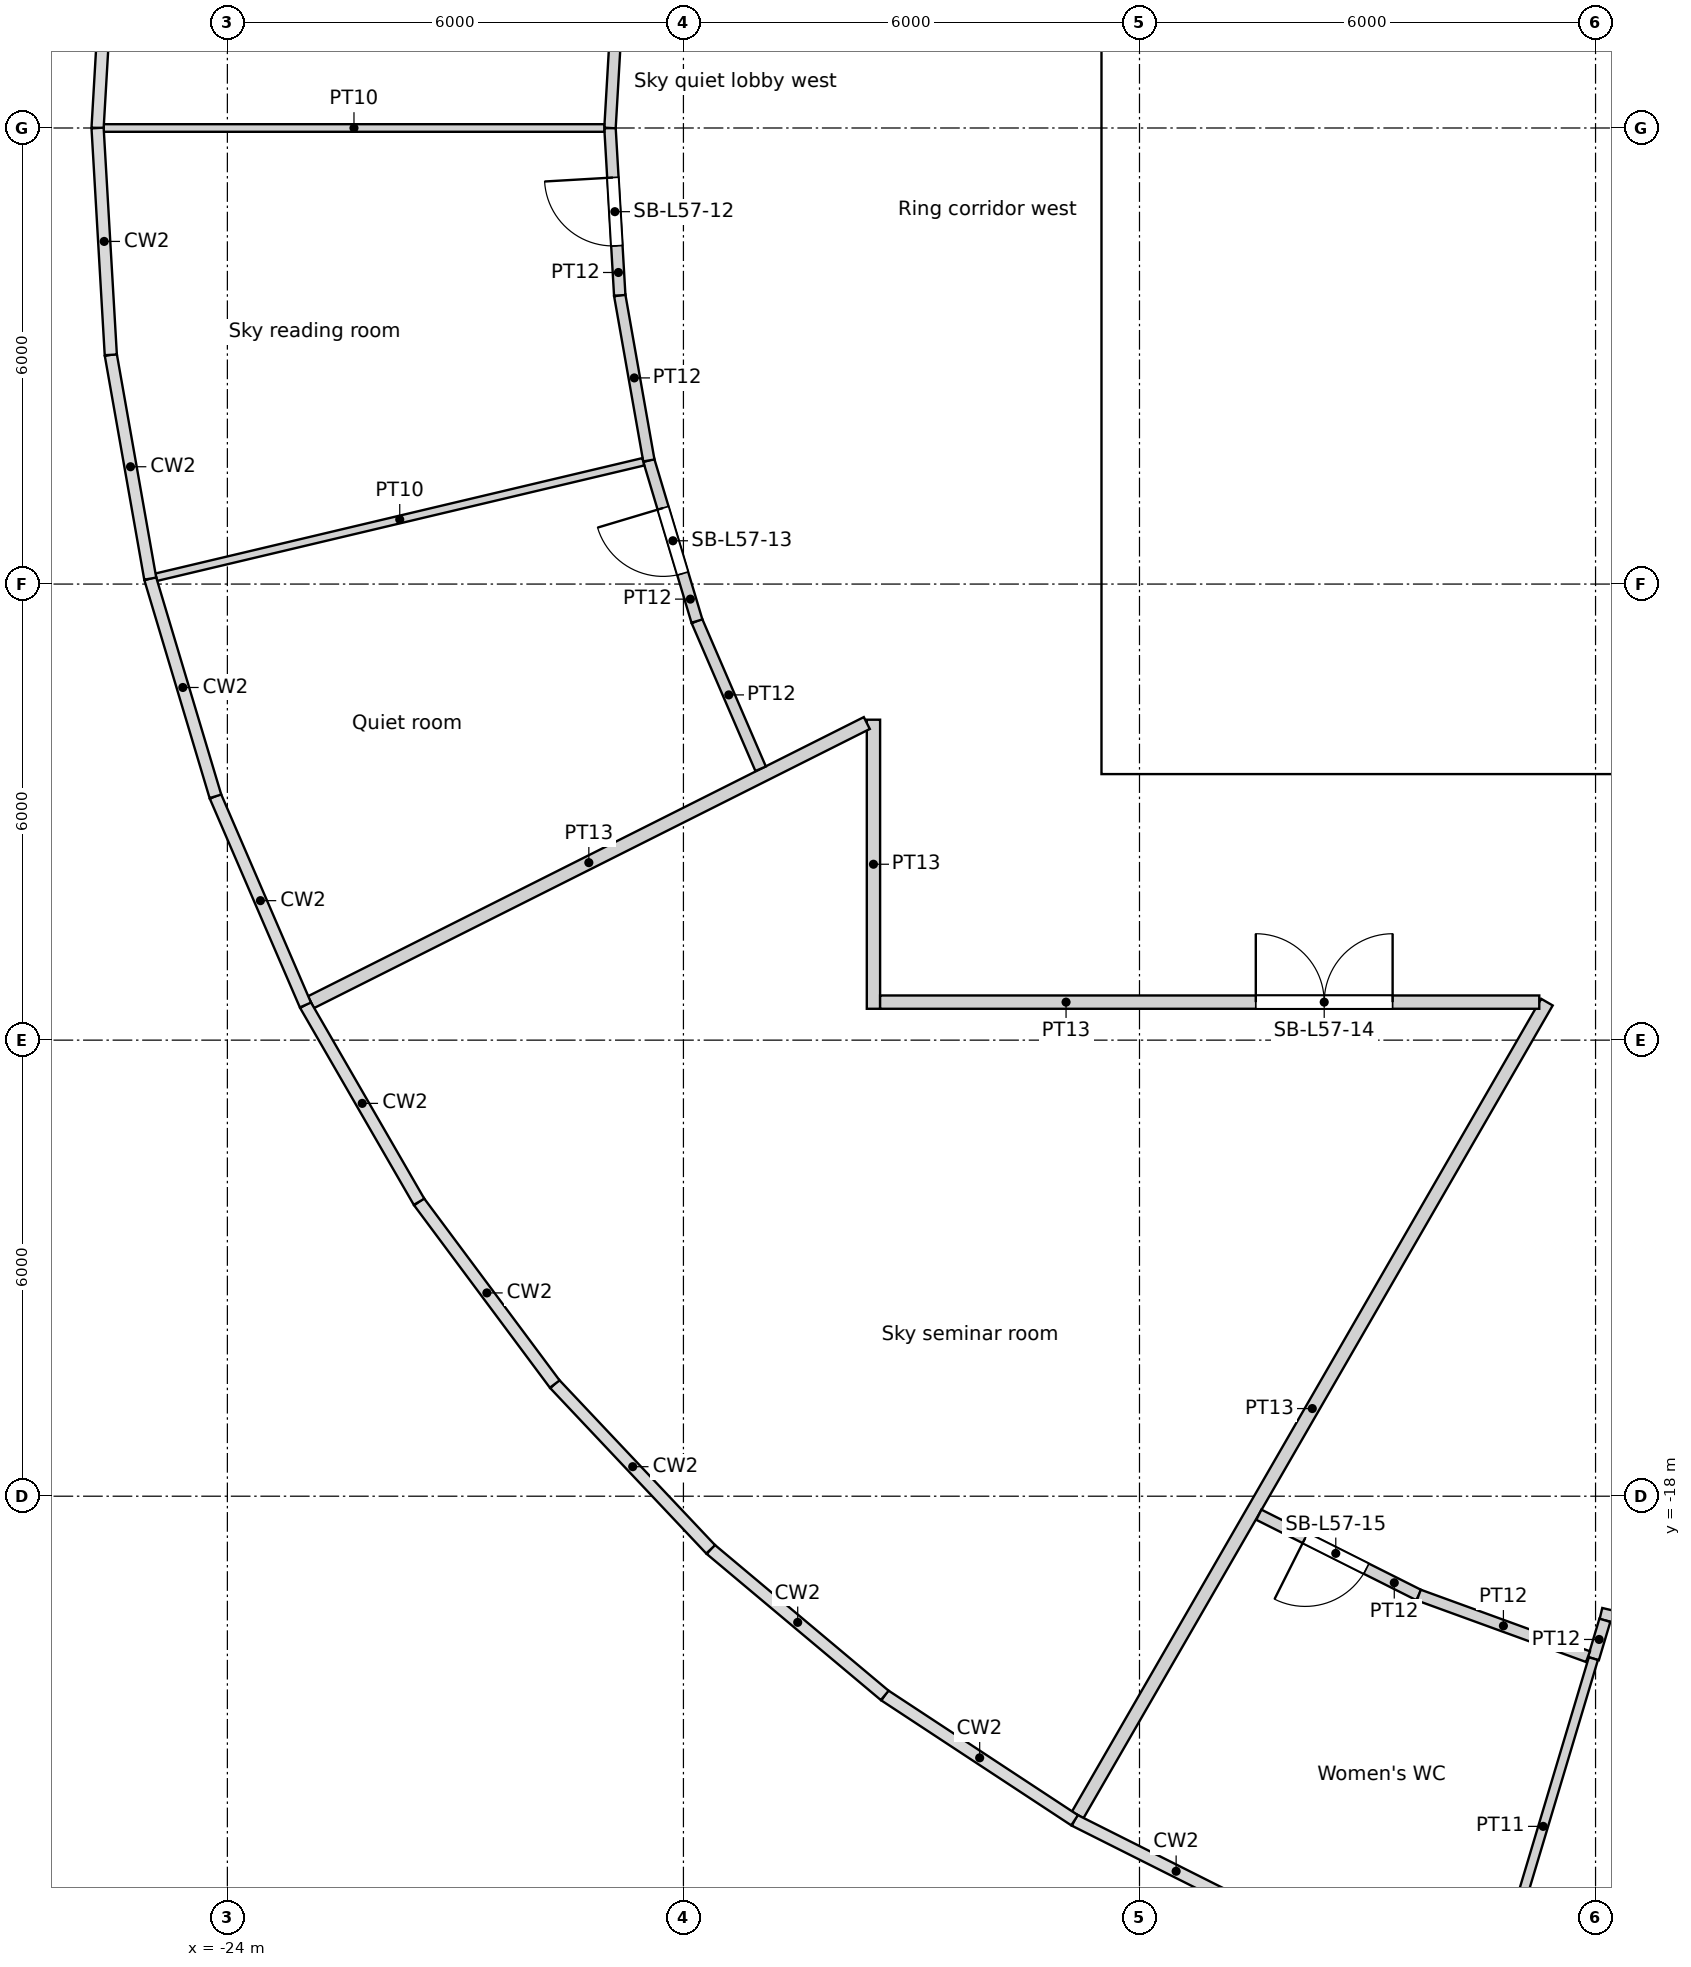
"""IFC4 building model, lengths in metres.
Left out: names, types, materials, properties, quantities, classifications, styles, units other than length and angle.
Written with IfcOpenShell. Run it as: python <this file> out.ifc"""

import sys

from ifc_helpers import new_model, si_unit, direction, frame, frame_2d, origin, origin_2d, place, context, subcontext, project, spatial, rectangle, circle, extrude, element, fill, save


model = new_model("IFC4")
c1 = context("Model", 3, precision=1e-05, world=origin(), true_north=direction((0.0, 1.0)))
c2 = subcontext(c1, "Body", "Model", "MODEL_VIEW")
j1 = project(units=[si_unit("LENGTHUNIT", "METRE"), si_unit("PLANEANGLEUNIT", "RADIAN")], contexts=[c1])
p1 = place(None, origin())
s1 = spatial("IfcSite", under=j1, at=p1, CompositionType="ELEMENT")
p2 = place(p1, origin())
s2 = spatial("IfcBuilding", under=s1, at=p2, CompositionType="ELEMENT")
p3 = place(p2, frame((0.0, 0.0, 219.6)))
s3 = spatial("IfcBuildingStorey", under=s2, at=p3, CompositionType="ELEMENT", Elevation=219.6)
for number, where, z_axis, x_axis in (
    (1, (-24.382, -2.85, 0.0), (0.0, 0.0, 1.0), (1.0, 0.0, 0.0)),
    (2, (-23.067, -8.396, 0.0), (0.0, 0.0, 1.0), (1.0, 0.0, 0.0)),
    (3, (-20.509, -13.489, 0.0), (0.0, 0.0, 1.0), (1.0, 0.0, 0.0)),
    (4, (-16.846, -17.855, 0.0), (0.0, 0.0, 1.0), (1.0, 0.0, 0.0)),
    (5, (-12.274, -21.259, 0.0), (0.0, 0.0, 1.0), (1.0, 0.0, 0.0)),
    (6, (-7.04, -23.516, 0.0), (0.0, 0.0, 1.0), (1.0, 0.0, 0.0)),
):
    element("IfcColumn", number, at=place(p3, frame(where, z_axis=z_axis, x_axis=x_axis)), inside=s3, PredefinedType="COLUMN", context=c2, shape_type="SweptSolid", body=[
        extrude(circle(Radius=0.6, at=origin_2d()), origin(), (0.0, 0.0, 1.0), 5.4),
    ])
for number, where, z_axis, x_axis in (
    (7, (-18.612, -2.805, 0.0), (0.0, 0.0, 1.0), (1.0, 0.0, 0.0)),
    (8, (-16.958, -8.167, 0.0), (0.0, 0.0, 1.0), (1.0, 0.0, 0.0)),
    (9, (-13.798, -12.802, 0.0), (0.0, 0.0, 1.0), (1.0, 0.0, 0.0)),
    (10, (-9.411, -16.301, 0.0), (0.0, 0.0, 1.0), (1.0, 0.0, 0.0)),
):
    element("IfcColumn", number, at=place(p3, frame(where, z_axis=z_axis, x_axis=x_axis)), inside=s3, PredefinedType="COLUMN", context=c2, shape_type="SweptSolid", body=[
        extrude(circle(Radius=0.65, at=origin_2d()), origin(), (0.0, 0.0, 1.0), 5.4),
    ])
p4 = place(p3, frame((-12.5, -8.05, 0.0), z_axis=(0.0, 0.0, 1.0), x_axis=(1.0, 0.0, 0.0)))
e11 = element("IfcWall", 11, at=p4, inside=s3, PredefinedType="SOLIDWALL", context=c2, shape_type="SweptSolid", body=[
    extrude(rectangle(XDim=25.0, YDim=0.9, at=frame_2d((12.5, 0.0))), origin(), (0.0, 0.0, 1.0), 5.4),
])
p5 = place(p4, frame((13.4, 0.0, 0.0)))
e12 = element("IfcOpeningElement", 12, at=p5, cuts=e11, PredefinedType="OPENING", context=c2, shape_type="SweptSolid", body=[
    extrude(rectangle(XDim=1.0, YDim=2.1, at=frame_2d((0.5, 1.05))), frame((0.0, 0.45, 0.0), z_axis=(0.0, -1.0, 0.0), x_axis=(1.0, 0.0, 0.0)), (0.0, 0.0, 1.0), 0.9),
])
p6 = place(p4, frame((8.3, 0.0, 0.0)))
e13 = element("IfcOpeningElement", 13, at=p6, cuts=e11, PredefinedType="OPENING", context=c2, shape_type="SweptSolid", body=[
    extrude(rectangle(XDim=1.8, YDim=2.1, at=frame_2d((0.9, 1.05))), frame((0.0, 0.45, 0.0), z_axis=(0.0, -1.0, 0.0), x_axis=(1.0, 0.0, 0.0)), (0.0, 0.0, 1.0), 0.9),
])
p7 = place(p4, frame((14.9, 0.0, 0.0)))
e14 = element("IfcOpeningElement", 14, at=p7, cuts=e11, PredefinedType="OPENING", context=c2, shape_type="SweptSolid", body=[
    extrude(rectangle(XDim=1.8, YDim=2.1, at=frame_2d((0.9, 1.05))), frame((0.0, 0.45, 0.0), z_axis=(0.0, -1.0, 0.0), x_axis=(1.0, 0.0, 0.0)), (0.0, 0.0, 1.0), 0.9),
])
p8 = place(p3, frame((-12.05, -7.6, 0.0), z_axis=(0.0, 0.0, 1.0), x_axis=(0.0, 1.0, 0.0)))
e15 = element("IfcWall", 15, at=p8, inside=s3, PredefinedType="SOLIDWALL", context=c2, shape_type="SweptSolid", body=[
    extrude(rectangle(XDim=15.2, YDim=0.9, at=frame_2d((7.6, 0.0))), origin(), (0.0, 0.0, 1.0), 5.4),
])
p9 = place(p8, frame((7.1, 0.0, 0.0)))
e16 = element("IfcOpeningElement", 16, at=p9, cuts=e15, PredefinedType="OPENING", context=c2, shape_type="SweptSolid", body=[
    extrude(rectangle(XDim=1.0, YDim=2.1, at=frame_2d((0.5, 1.05))), frame((0.0, 0.45, 0.0), z_axis=(0.0, -1.0, 0.0), x_axis=(1.0, 0.0, 0.0)), (0.0, 0.0, 1.0), 0.9),
])
p10 = place(p3, frame((-8.9, -3.1, 0.0), z_axis=(0.0, 0.0, 1.0), x_axis=(1.0, 0.0, 0.0)))
e17 = element("IfcWall", 17, at=p10, inside=s3, PredefinedType="SOLIDWALL", context=c2, shape_type="SweptSolid", body=[
    extrude(rectangle(XDim=9.6, YDim=0.3, at=frame_2d((4.8, 0.0))), origin(), (0.0, 0.0, 1.0), 4.9),
])
p11 = place(p10, frame((4.75, 0.0, 0.0)))
e18 = element("IfcOpeningElement", 18, at=p11, cuts=e17, PredefinedType="OPENING", context=c2, shape_type="SweptSolid", body=[
    extrude(rectangle(XDim=1.7, YDim=2.1, at=frame_2d((0.85, 1.05))), frame((0.0, 0.15, 0.0), z_axis=(0.0, -1.0, 0.0), x_axis=(1.0, 0.0, 0.0)), (0.0, 0.0, 1.0), 0.3),
])
p12 = place(p3, frame((-8.9, 0.0, 0.0), z_axis=(0.0, 0.0, 1.0), x_axis=(1.0, 0.0, 0.0)))
e19 = element("IfcWall", 19, at=p12, inside=s3, PredefinedType="SOLIDWALL", context=c2, shape_type="SweptSolid", body=[
    extrude(rectangle(XDim=3.0, YDim=0.3, at=frame_2d((1.5, 0.0))), origin(), (0.0, 0.0, 1.0), 4.9),
])
p13 = place(p3, frame((-5.75, -2.95, 0.0), z_axis=(0.0, 0.0, 1.0), x_axis=(0.0, 1.0, 0.0)))
e20 = element("IfcWall", 20, at=p13, inside=s3, PredefinedType="SOLIDWALL", context=c2, shape_type="SweptSolid", body=[
    extrude(rectangle(XDim=5.9, YDim=0.3, at=frame_2d((2.95, 0.0))), origin(), (0.0, 0.0, 1.0), 4.9),
])
p14 = place(p13, frame((0.75, 0.0, 0.0)))
e21 = element("IfcOpeningElement", 21, at=p14, cuts=e20, PredefinedType="OPENING", context=c2, shape_type="SweptSolid", body=[
    extrude(rectangle(XDim=1.3, YDim=2.1, at=frame_2d((0.65, 1.05))), frame((0.0, 0.15, 0.0), z_axis=(0.0, -1.0, 0.0), x_axis=(1.0, 0.0, 0.0)), (0.0, 0.0, 1.0), 0.3),
])
p15 = place(p13, frame((3.85, 0.0, 0.0)))
e22 = element("IfcOpeningElement", 22, at=p15, cuts=e20, PredefinedType="OPENING", context=c2, shape_type="SweptSolid", body=[
    extrude(rectangle(XDim=1.3, YDim=2.1, at=frame_2d((0.65, 1.05))), frame((0.0, 0.15, 0.0), z_axis=(0.0, -1.0, 0.0), x_axis=(1.0, 0.0, 0.0)), (0.0, 0.0, 1.0), 0.3),
])
p16 = place(p3, frame((-9.05, -7.0, 0.0), z_axis=(0.0, 0.0, 1.0), x_axis=(0.0, 1.0, 0.0)))
e23 = element("IfcWall", 23, at=p16, inside=s3, PredefinedType="SOLIDWALL", context=c2, shape_type="SweptSolid", body=[
    extrude(rectangle(XDim=14.6, YDim=0.3, at=frame_2d((7.3, 0.0))), origin(), (0.0, 0.0, 1.0), 4.9),
])
p17 = place(p3, frame((-9.05, -7.15, 0.0), z_axis=(0.0, 0.0, 1.0), x_axis=(1.0, 0.0, 0.0)))
e24 = element("IfcWall", 24, at=p17, inside=s3, PredefinedType="SOLIDWALL", context=c2, shape_type="SweptSolid", body=[
    extrude(rectangle(XDim=4.85, YDim=0.9, at=frame_2d((2.425, 0.0))), origin(), (0.0, 0.0, 1.0), 4.9),
])
p18 = place(p3, frame((-8.9, -6.55, 0.0), z_axis=(0.0, 0.0, 1.0), x_axis=(1.0, 0.0, 0.0)))
e25 = element("IfcWall", 25, at=p18, inside=s3, PredefinedType="SOLIDWALL", context=c2, shape_type="SweptSolid", body=[
    extrude(rectangle(XDim=4.7, YDim=0.3, at=frame_2d((2.35, 0.0))), origin(), (0.0, 0.0, 1.0), 4.9),
])
p19 = place(p3, frame((-11.6, -4.55, 0.0), z_axis=(0.0, 0.0, 1.0), x_axis=(1.0, 0.0, 0.0)))
e26 = element("IfcWall", 26, at=p19, inside=s3, PredefinedType="SOLIDWALL", context=c2, shape_type="SweptSolid", body=[
    extrude(rectangle(XDim=2.4, YDim=0.3, at=frame_2d((1.2, 0.0))), origin(), (0.0, 0.0, 1.0), 4.9),
])
p20 = place(p19, frame((0.65, 0.0, 0.0)))
e27 = element("IfcOpeningElement", 27, at=p20, cuts=e26, PredefinedType="OPENING", context=c2, shape_type="SweptSolid", body=[
    extrude(rectangle(XDim=1.1, YDim=2.1, at=frame_2d((0.55, 1.05))), frame((0.0, 0.15, 0.0), z_axis=(0.0, -1.0, 0.0), x_axis=(1.0, 0.0, 0.0)), (0.0, 0.0, 1.0), 0.3),
])
p21 = place(p3, frame((-25.627, 0.0, 0.0), z_axis=(0.0, 0.0, 1.0), x_axis=(1.0, 0.0, 0.0)))
e28 = element("IfcWall", 28, at=p21, inside=s3, PredefinedType="PARTITIONING", context=c2, shape_type="SweptSolid", body=[
    extrude(rectangle(XDim=6.586, YDim=0.1, at=frame_2d((3.293, 0.0))), origin(), (0.0, 0.0, 1.0), 4.1),
])
p22 = place(p3, frame((-24.937, -5.91, 0.0), z_axis=(0.0, 0.0, 1.0), x_axis=(0.973037610496, 0.230646501296, 0.0)))
e29 = element("IfcWall", 29, at=p22, inside=s3, PredefinedType="PARTITIONING", context=c2, shape_type="SweptSolid", body=[
    extrude(rectangle(XDim=6.586, YDim=0.1, at=frame_2d((3.293, 0.0))), origin(), (0.0, 0.0, 1.0), 4.1),
])
p23 = place(p3, frame((-22.902, -11.502, 0.0), z_axis=(0.0, 0.0, 1.0), x_axis=(0.893632344916, 0.448799768404, 0.0)))
e30 = element("IfcWall", 30, at=p23, inside=s3, PredefinedType="PARTITIONING", context=c2, shape_type="SweptSolid", body=[
    extrude(rectangle(XDim=8.185, YDim=0.175, at=frame_2d((4.092, 0.0))), origin(), (0.0, 0.0, 1.0), 4.1),
])
p24 = place(p3, frame((-18.838, -2.202, 0.0), z_axis=(0.0, 0.0, 1.0), x_axis=(-0.058112072782, 0.998310065559, 0.0)))
e31 = element("IfcWall", 31, at=p24, inside=s3, PredefinedType="PARTITIONING", context=c2, shape_type="SweptSolid", body=[
    extrude(rectangle(XDim=2.206, YDim=0.15, at=frame_2d((1.103, 0.0))), origin(), (0.0, 0.0, 1.0), 4.1),
])
p25 = place(p24, frame((0.653, 0.0, 0.0)))
e32 = element("IfcOpeningElement", 32, at=p25, cuts=e31, PredefinedType="OPENING", context=c2, shape_type="SweptSolid", body=[
    extrude(rectangle(XDim=0.9, YDim=2.1, at=frame_2d((0.45, 1.05))), frame((0.0, 0.075, 0.0), z_axis=(0.0, -1.0, 0.0), x_axis=(1.0, 0.0, 0.0)), (0.0, 0.0, 1.0), 0.15),
])
p26 = place(p3, frame((-18.838, -2.202, 0.0), z_axis=(0.0, 0.0, 1.0), x_axis=(0.173690605338, -0.984800270927, 0.0)))
e33 = element("IfcWall", 33, at=p26, inside=s3, PredefinedType="PARTITIONING", context=c2, shape_type="SweptSolid", body=[
    extrude(rectangle(XDim=2.205, YDim=0.15, at=frame_2d((1.103, 0.0))), origin(), (0.0, 0.0, 1.0), 4.1),
])
p27 = place(p3, frame((-18.838, 2.202, 0.0), z_axis=(0.0, 0.0, 1.0), x_axis=(-0.058112072782, -0.998310065559, 0.0)))
e34 = element("IfcWall", 34, at=p27, inside=s3, PredefinedType="PARTITIONING", context=c2, shape_type="SweptSolid", body=[
    extrude(rectangle(XDim=2.206, YDim=0.15, at=frame_2d((1.103, 0.0))), origin(), (0.0, 0.0, 1.0), 4.1),
])
p28 = place(p3, frame((-17.822, -6.487, 0.0), z_axis=(0.0, 0.0, 1.0), x_axis=(-0.286789325677, 0.957993675698, 0.0)))
e35 = element("IfcWall", 35, at=p28, inside=s3, PredefinedType="PARTITIONING", context=c2, shape_type="SweptSolid", body=[
    extrude(rectangle(XDim=2.206, YDim=0.15, at=frame_2d((1.103, 0.0))), origin(), (0.0, 0.0, 1.0), 4.1),
])
p29 = place(p28, frame((0.653, 0.0, 0.0)))
e36 = element("IfcOpeningElement", 36, at=p29, cuts=e35, PredefinedType="OPENING", context=c2, shape_type="SweptSolid", body=[
    extrude(rectangle(XDim=0.9, YDim=2.1, at=frame_2d((0.45, 1.05))), frame((0.0, 0.075, 0.0), z_axis=(0.0, -1.0, 0.0), x_axis=(1.0, 0.0, 0.0)), (0.0, 0.0, 1.0), 0.15),
])
p30 = place(p3, frame((-17.822, -6.487, 0.0), z_axis=(0.0, 0.0, 1.0), x_axis=(0.396049140971, -0.918229316639, 0.0)))
e37 = element("IfcWall", 37, at=p30, inside=s3, PredefinedType="PARTITIONING", context=c2, shape_type="SweptSolid", body=[
    extrude(rectangle(XDim=2.116, YDim=0.15, at=frame_2d((1.058, 0.0))), origin(), (0.0, 0.0, 1.0), 4.1),
])
p31 = place(p3, frame((-6.74, -11.5, 0.0), z_axis=(0.0, 0.0, 1.0), x_axis=(-1.0, 0.0, 0.0)))
e38 = element("IfcWall", 38, at=p31, inside=s3, PredefinedType="PARTITIONING", context=c2, shape_type="SweptSolid", body=[
    extrude(rectangle(XDim=8.672, YDim=0.175, at=frame_2d((4.336, 0.0))), origin(), (0.0, 0.0, 1.0), 4.1),
])
p32 = place(p31, frame((1.929, 0.0, 0.0)))
e39 = element("IfcOpeningElement", 39, at=p32, cuts=e38, PredefinedType="OPENING", context=c2, shape_type="SweptSolid", body=[
    extrude(rectangle(XDim=1.8, YDim=2.4, at=frame_2d((0.9, 1.2))), frame((0.0, 0.087, 0.0), z_axis=(0.0, -1.0, 0.0), x_axis=(1.0, 0.0, 0.0)), (0.0, 0.0, 1.0), 0.175),
])
p33 = place(p3, frame((-15.5, -7.784, 0.0), z_axis=(0.0, 0.0, 1.0), x_axis=(0.0, -1.0, 0.0)))
e40 = element("IfcWall", 40, at=p33, inside=s3, PredefinedType="PARTITIONING", context=c2, shape_type="SweptSolid", body=[
    extrude(rectangle(XDim=3.803, YDim=0.175, at=frame_2d((1.901, 0.0))), origin(), (0.0, 0.0, 1.0), 4.1),
])
p34 = place(p3, frame((-12.814, -22.194, 0.0), z_axis=(0.0, 0.0, 1.0), x_axis=(0.500004836318, 0.866022611517, 0.0)))
e41 = element("IfcWall", 41, at=p34, inside=s3, PredefinedType="PARTITIONING", context=c2, shape_type="SweptSolid", body=[
    extrude(rectangle(XDim=12.349, YDim=0.175, at=frame_2d((6.174, 0.0))), origin(), (0.0, 0.0, 1.0), 4.1),
])
p35 = place(p3, frame((-8.325, -19.301, 0.0), z_axis=(0.0, 0.0, 1.0), x_axis=(-0.893637725356, 0.448789054925, 0.0)))
e42 = element("IfcWall", 42, at=p35, inside=s3, PredefinedType="PARTITIONING", context=c2, shape_type="SweptSolid", body=[
    extrude(rectangle(XDim=2.354, YDim=0.15, at=frame_2d((1.177, 0.0))), origin(), (0.0, 0.0, 1.0), 4.1),
])
p36 = place(p35, frame((0.772, 0.0, 0.0)))
e43 = element("IfcOpeningElement", 43, at=p36, cuts=e42, PredefinedType="OPENING", context=c2, shape_type="SweptSolid", body=[
    extrude(rectangle(XDim=0.9, YDim=2.1, at=frame_2d((0.45, 1.05))), frame((0.0, 0.075, 0.0), z_axis=(0.0, -1.0, 0.0), x_axis=(1.0, 0.0, 0.0)), (0.0, 0.0, 1.0), 0.15),
])
p37 = place(p3, frame((-8.325, -19.301, 0.0), z_axis=(0.0, 0.0, 1.0), x_axis=(0.939694096766, -0.342016088076, 0.0)))
e44 = element("IfcWall", 44, at=p37, inside=s3, PredefinedType="PARTITIONING", context=c2, shape_type="SweptSolid", body=[
    extrude(rectangle(XDim=2.369, YDim=0.15, at=frame_2d((1.185, 0.0))), origin(), (0.0, 0.0, 1.0), 4.1),
])
p38 = place(p3, frame((-7.35, -24.551, 0.0), z_axis=(0.0, 0.0, 1.0), x_axis=(0.286813119871, 0.957986552239, 0.0)))
e45 = element("IfcWall", 45, at=p38, inside=s3, PredefinedType="PARTITIONING", context=c2, shape_type="SweptSolid", body=[
    extrude(rectangle(XDim=4.608, YDim=0.125, at=frame_2d((2.304, 0.0))), origin(), (0.0, 0.0, 1.0), 4.1),
])
p39 = place(p3, frame((-6.029, -20.137, 0.0), z_axis=(0.0, 0.0, 1.0), x_axis=(0.286709384519, 0.958017603611, 0.0)))
e46 = element("IfcWall", 46, at=p39, inside=s3, PredefinedType="PARTITIONING", context=c2, shape_type="SweptSolid", body=[
    extrude(rectangle(XDim=0.526, YDim=0.15, at=frame_2d((0.263, 0.0))), origin(), (0.0, 0.0, 1.0), 4.1),
])
p40 = place(p3, frame((-5.929, -19.543, 0.0), z_axis=(0.0, 0.0, 1.0), x_axis=(0.973042041456, -0.230627807429, 0.0)))
e47 = element("IfcWall", 47, at=p40, inside=s3, PredefinedType="PARTITIONING", context=c2, shape_type="SweptSolid", body=[
    extrude(rectangle(XDim=2.449, YDim=0.15, at=frame_2d((1.225, 0.0))), origin(), (0.0, 0.0, 1.0), 4.1),
])
p41 = place(p9, origin())
e48 = element("IfcDoor", 48, at=p41, inside=s3, OperationType="DOUBLE_DOOR_SINGLE_SWING", PredefinedType="DOOR", context=c2, shape_type="SweptSolid", body=[
    extrude(rectangle(XDim=1.0, YDim=2.1, at=frame_2d((0.5, 1.05))), frame((0.0, 0.025, 0.0), z_axis=(0.0, -1.0, 0.0), x_axis=(1.0, 0.0, 0.0)), (0.0, 0.0, 1.0), 0.05),
])
fill(e16, e48)
p42 = place(p20, origin())
e49 = element("IfcDoor", 49, at=p42, inside=s3, OperationType="SLIDING_TO_RIGHT", PredefinedType="DOOR", context=c2, shape_type="SweptSolid", body=[
    extrude(rectangle(XDim=1.1, YDim=2.1, at=frame_2d((0.55, 1.05))), frame((0.0, 0.025, 0.0), z_axis=(0.0, -1.0, 0.0), x_axis=(1.0, 0.0, 0.0)), (0.0, 0.0, 1.0), 0.05),
])
fill(e27, e49)
p43 = place(p25, origin())
e50 = element("IfcDoor", 50, at=p43, inside=s3, OperationType="SINGLE_SWING_RIGHT", PredefinedType="DOOR", context=c2, shape_type="SweptSolid", body=[
    extrude(rectangle(XDim=0.9, YDim=2.1, at=frame_2d((0.45, 1.05))), frame((0.0, 0.025, 0.0), z_axis=(0.0, -1.0, 0.0), x_axis=(1.0, 0.0, 0.0)), (0.0, 0.0, 1.0), 0.05),
])
fill(e32, e50)
p44 = place(p29, origin())
e51 = element("IfcDoor", 51, at=p44, inside=s3, OperationType="SINGLE_SWING_RIGHT", PredefinedType="DOOR", context=c2, shape_type="SweptSolid", body=[
    extrude(rectangle(XDim=0.9, YDim=2.1, at=frame_2d((0.45, 1.05))), frame((0.0, 0.025, 0.0), z_axis=(0.0, -1.0, 0.0), x_axis=(1.0, 0.0, 0.0)), (0.0, 0.0, 1.0), 0.05),
])
fill(e36, e51)
p45 = place(p32, origin())
e52 = element("IfcDoor", 52, at=p45, inside=s3, OperationType="DOUBLE_DOOR_SINGLE_SWING", PredefinedType="DOOR", context=c2, shape_type="SweptSolid", body=[
    extrude(rectangle(XDim=1.8, YDim=2.4, at=frame_2d((0.9, 1.2))), frame((0.0, 0.025, 0.0), z_axis=(0.0, -1.0, 0.0), x_axis=(1.0, 0.0, 0.0)), (0.0, 0.0, 1.0), 0.05),
])
fill(e39, e52)
p46 = place(p36, origin())
e53 = element("IfcDoor", 53, at=p46, inside=s3, OperationType="SINGLE_SWING_RIGHT", PredefinedType="DOOR", context=c2, shape_type="SweptSolid", body=[
    extrude(rectangle(XDim=0.9, YDim=2.1, at=frame_2d((0.45, 1.05))), frame((0.0, 0.025, 0.0), z_axis=(0.0, -1.0, 0.0), x_axis=(1.0, 0.0, 0.0)), (0.0, 0.0, 1.0), 0.05),
])
fill(e43, e53)
save(model, sys.argv[1])
